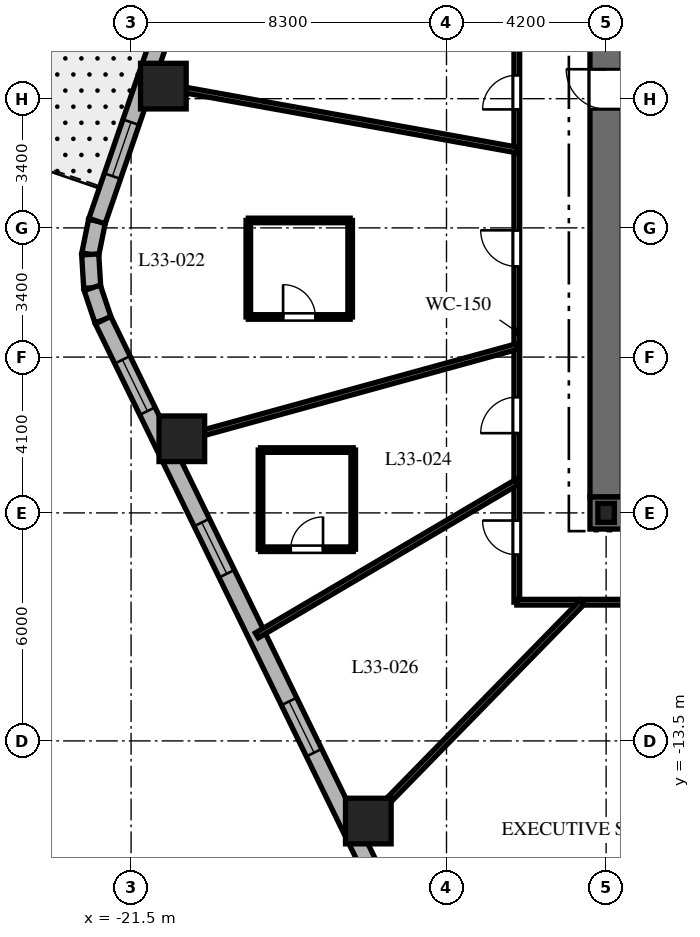
"""IFC4 building model, lengths in metres.
Left out: names, types, materials, properties, quantities, classifications, styles, units other than length and angle.
Written with IfcOpenShell. Run it as: python <this file> out.ifc"""

import sys

from ifc_helpers import new_model, si_unit, direction, frame, frame_2d, origin, origin_2d, place, context, subcontext, project, spatial, rectangle, i_section, extrude, element, fill, save


model = new_model("IFC4")
c1 = context("Model", 3, precision=1e-05, world=origin(), true_north=direction((0.0, 1.0)))
c2 = subcontext(c1, "Body", "Model", "MODEL_VIEW")
j1 = project(units=[si_unit("LENGTHUNIT", "METRE"), si_unit("PLANEANGLEUNIT", "RADIAN")], contexts=[c1])
p1 = place(None, origin())
s1 = spatial("IfcSite", under=j1, at=p1, CompositionType="ELEMENT")
p2 = place(p1, origin())
s2 = spatial("IfcBuilding", under=s1, at=p2, CompositionType="ELEMENT")
p3 = place(p2, frame((0.0, 0.0, 135.8)))
s3 = spatial("IfcBuildingStorey", under=s2, at=p3, CompositionType="ELEMENT", Elevation=135.8)
p4 = place(p3, frame((-9.425, -7.5, 0.0), z_axis=(0.0, 0.0, 1.0), x_axis=(1.0, 0.0, 0.0)))
e1 = element("IfcWall", 1, at=p4, inside=s3, PredefinedType="SHEAR", context=c2, shape_type="SweptSolid", body=[
    extrude(rectangle(XDim=18.85, YDim=0.85, at=frame_2d((9.425, 0.0))), origin(), (0.0, 0.0, 1.0), 3.7),
])
p5 = place(p4, frame((9.475, 0.0, 0.0)))
e2 = element("IfcOpeningElement", 2, at=p5, cuts=e1, PredefinedType="OPENING", context=c2, shape_type="SweptSolid", body=[
    extrude(rectangle(XDim=1.0, YDim=2.15, at=frame_2d((0.5, 1.075))), frame((0.0, 0.435, 0.0), z_axis=(0.0, -1.0, 0.0), x_axis=(1.0, 0.0, 0.0)), (0.0, 0.0, 1.0), 0.87),
])
p6 = place(p3, frame((-9.0, -7.075, 0.0), z_axis=(0.0, 0.0, 1.0), x_axis=(0.0, 1.0, 0.0)))
e3 = element("IfcWall", 3, at=p6, inside=s3, PredefinedType="SHEAR", context=c2, shape_type="SweptSolid", body=[
    extrude(rectangle(XDim=14.15, YDim=0.85, at=frame_2d((7.075, 0.0))), origin(), (0.0, 0.0, 1.0), 3.7),
])
p7 = place(p6, frame((10.2, 0.0, 0.0)))
e4 = element("IfcOpeningElement", 4, at=p7, cuts=e3, PredefinedType="OPENING", context=c2, shape_type="SweptSolid", body=[
    extrude(rectangle(XDim=1.05, YDim=2.15, at=frame_2d((0.525, 1.075))), frame((0.0, 0.435, 0.0), z_axis=(0.0, -1.0, 0.0), x_axis=(1.0, 0.0, 0.0)), (0.0, 0.0, 1.0), 0.87),
])
p8 = place(p3, frame((-9.0, -7.5, 0.0), z_axis=(0.0, 0.0, 1.0), x_axis=(1.0, 0.0, 0.0)))
e5 = element("IfcColumn", 5, at=p8, inside=s3, PredefinedType="COLUMN", context=c2, shape_type="SweptSolid", body=[
    extrude(i_section(OverallWidth=0.432, OverallDepth=0.498, WebThickness=0.056, FlangeThickness=0.089, at=origin_2d()), origin(), (0.0, 0.0, 1.0), 3.7),
])
for number, where, z_axis, x_axis in (
    (6, (-20.65, 3.731, 0.0), (0.0, 0.0, 1.0), (1.0, 0.0, 0.0)),
    (7, (-20.164, -5.549, 0.0), (0.0, 0.0, 1.0), (1.0, 0.0, 0.0)),
    (8, (-15.257, -15.609, 0.0), (0.0, 0.0, 1.0), (1.0, 0.0, 0.0)),
):
    element("IfcColumn", number, at=place(p3, frame(where, z_axis=z_axis, x_axis=x_axis)), inside=s3, PredefinedType="COLUMN", context=c2, shape_type="SweptSolid", body=[
        extrude(rectangle(XDim=1.2, YDim=1.2, at=origin_2d()), origin(), (0.0, 0.0, 1.0), 3.7),
    ])
p9 = place(p3, frame((-22.397, 0.179, 0.0), z_axis=(0.0, 0.0, 1.0), x_axis=(-0.199313589404, -0.979935759669, 0.0)))
e9 = element("IfcWall", 9, at=p9, inside=s3, PredefinedType="SOLIDWALL", context=c2, shape_type="SweptSolid", body=[
    extrude(rectangle(XDim=0.896, YDim=0.45, at=frame_2d((0.448, 0.0))), origin(), (0.0, 0.0, 1.0), 3.38),
])
p10 = place(p3, frame((-22.575, -0.698, 0.0), z_axis=(0.0, 0.0, 1.0), x_axis=(0.060980441946, -0.998138961117, 0.0)))
e10 = element("IfcWall", 10, at=p10, inside=s3, PredefinedType="SOLIDWALL", context=c2, shape_type="SweptSolid", body=[
    extrude(rectangle(XDim=0.881, YDim=0.45, at=frame_2d((0.44, 0.0))), origin(), (0.0, 0.0, 1.0), 3.38),
])
p11 = place(p3, frame((-22.522, -1.577, 0.0), z_axis=(0.0, 0.0, 1.0), x_axis=(0.317372694837, -0.948300887151, 0.0)))
e11 = element("IfcWall", 11, at=p11, inside=s3, PredefinedType="SOLIDWALL", context=c2, shape_type="SweptSolid", body=[
    extrude(rectangle(XDim=0.896, YDim=0.45, at=frame_2d((0.448, 0.0))), origin(), (0.0, 0.0, 1.0), 3.38),
])
p12 = place(p3, frame((-15.992, 18.777, 0.0), z_axis=(0.0, 0.0, 1.0), x_axis=(-0.325606988926, -0.945505202927, 0.0)))
e12 = element("IfcWall", 12, at=p12, inside=s3, PredefinedType="SOLIDWALL", context=c2, shape_type="SweptSolid", body=[
    extrude(rectangle(XDim=19.669, YDim=0.45, at=frame_2d((9.835, 0.0))), origin(), (0.0, 0.0, 1.0), 3.38),
])
p13 = place(p12, frame((4.909, 0.0, 0.0)))
e13 = element("IfcOpeningElement", 13, at=p13, cuts=e12, PredefinedType="OPENING", context=c2, shape_type="SweptSolid", body=[
    extrude(rectangle(XDim=1.0, YDim=2.15, at=frame_2d((0.5, 1.075))), frame((0.0, 0.235, 0.0), z_axis=(0.0, -1.0, 0.0), x_axis=(1.0, 0.0, 0.0)), (0.0, 0.0, 1.0), 0.47),
])
p14 = place(p12, frame((1.197, 0.0, 0.8)))
e14 = element("IfcOpeningElement", 14, at=p14, cuts=e12, PredefinedType="OPENING", context=c2, shape_type="SweptSolid", body=[
    extrude(rectangle(XDim=1.5, YDim=1.8, at=frame_2d((0.75, 0.9))), frame((0.0, 0.235, 0.0), z_axis=(0.0, -1.0, 0.0), x_axis=(1.0, 0.0, 0.0)), (0.0, 0.0, 1.0), 0.47),
])
p15 = place(p12, frame((6.72, 0.0, 0.8)))
e15 = element("IfcOpeningElement", 15, at=p15, cuts=e12, PredefinedType="OPENING", context=c2, shape_type="SweptSolid", body=[
    extrude(rectangle(XDim=1.5, YDim=1.8, at=frame_2d((0.75, 0.9))), frame((0.0, 0.235, 0.0), z_axis=(0.0, -1.0, 0.0), x_axis=(1.0, 0.0, 0.0)), (0.0, 0.0, 1.0), 0.47),
])
p16 = place(p12, frame((12.238, 0.0, 0.8)))
e16 = element("IfcOpeningElement", 16, at=p16, cuts=e12, PredefinedType="OPENING", context=c2, shape_type="SweptSolid", body=[
    extrude(rectangle(XDim=1.5, YDim=1.8, at=frame_2d((0.75, 0.9))), frame((0.0, 0.235, 0.0), z_axis=(0.0, -1.0, 0.0), x_axis=(1.0, 0.0, 0.0)), (0.0, 0.0, 1.0), 0.47),
])
p17 = place(p12, frame((16.918, 0.0, 0.8)))
e17 = element("IfcOpeningElement", 17, at=p17, cuts=e12, PredefinedType="OPENING", context=c2, shape_type="SweptSolid", body=[
    extrude(rectangle(XDim=1.5, YDim=1.8, at=frame_2d((0.75, 0.9))), frame((0.0, 0.235, 0.0), z_axis=(0.0, -1.0, 0.0), x_axis=(1.0, 0.0, 0.0)), (0.0, 0.0, 1.0), 0.47),
])
p18 = place(p3, frame((-22.238, -2.427, 0.0), z_axis=(0.0, 0.0, 1.0), x_axis=(0.438374803278, -0.898792262901, 0.0)))
e18 = element("IfcWall", 18, at=p18, inside=s3, PredefinedType="SOLIDWALL", context=c2, shape_type="SweptSolid", body=[
    extrude(rectangle(XDim=18.618, YDim=0.45, at=frame_2d((9.309, 0.0))), origin(), (0.0, 0.0, 1.0), 3.38),
])
p19 = place(p18, frame((1.163, 0.0, 0.8)))
e19 = element("IfcOpeningElement", 19, at=p19, cuts=e18, PredefinedType="OPENING", context=c2, shape_type="SweptSolid", body=[
    extrude(rectangle(XDim=1.5, YDim=1.8, at=frame_2d((0.75, 0.9))), frame((0.0, 0.235, 0.0), z_axis=(0.0, -1.0, 0.0), x_axis=(1.0, 0.0, 0.0)), (0.0, 0.0, 1.0), 0.47),
])
p20 = place(p18, frame((5.926, 0.0, 0.8)))
e20 = element("IfcOpeningElement", 20, at=p20, cuts=e18, PredefinedType="OPENING", context=c2, shape_type="SweptSolid", body=[
    extrude(rectangle(XDim=1.5, YDim=1.8, at=frame_2d((0.75, 0.9))), frame((0.0, 0.235, 0.0), z_axis=(0.0, -1.0, 0.0), x_axis=(1.0, 0.0, 0.0)), (0.0, 0.0, 1.0), 0.47),
])
p21 = place(p18, frame((11.165, 0.0, 0.8)))
e21 = element("IfcOpeningElement", 21, at=p21, cuts=e18, PredefinedType="OPENING", context=c2, shape_type="SweptSolid", body=[
    extrude(rectangle(XDim=1.5, YDim=1.8, at=frame_2d((0.75, 0.9))), frame((0.0, 0.235, 0.0), z_axis=(0.0, -1.0, 0.0), x_axis=(1.0, 0.0, 0.0)), (0.0, 0.0, 1.0), 0.47),
])
p22 = place(p18, frame((16.006, 0.0, 0.8)))
e22 = element("IfcOpeningElement", 22, at=p22, cuts=e18, PredefinedType="OPENING", context=c2, shape_type="SweptSolid", body=[
    extrude(rectangle(XDim=1.5, YDim=1.8, at=frame_2d((0.75, 0.9))), frame((0.0, 0.235, 0.0), z_axis=(0.0, -1.0, 0.0), x_axis=(1.0, 0.0, 0.0)), (0.0, 0.0, 1.0), 0.47),
])
p23 = place(p3, frame((-11.35, -9.85, 0.0), z_axis=(0.0, 0.0, 1.0), x_axis=(0.0, 1.0, 0.0)))
e23 = element("IfcWall", 23, at=p23, inside=s3, PredefinedType="PARTITIONING", context=c2, shape_type="SweptSolid", body=[
    extrude(rectangle(XDim=19.7, YDim=0.15, at=frame_2d((9.85, 0.0))), origin(), (0.0, 0.0, 1.0), 2.82),
])
p24 = place(p23, frame((16.711, 0.0, 0.0)))
e24 = element("IfcOpeningElement", 24, at=p24, cuts=e23, PredefinedType="OPENING", context=c2, shape_type="SweptSolid", body=[
    extrude(rectangle(XDim=0.95, YDim=2.03, at=frame_2d((0.475, 1.015))), frame((0.0, 0.085, 0.0), z_axis=(0.0, -1.0, 0.0), x_axis=(1.0, 0.0, 0.0)), (0.0, 0.0, 1.0), 0.17),
])
p25 = place(p23, frame((12.968, 0.0, 0.0)))
e25 = element("IfcOpeningElement", 25, at=p25, cuts=e23, PredefinedType="OPENING", context=c2, shape_type="SweptSolid", body=[
    extrude(rectangle(XDim=0.9, YDim=2.03, at=frame_2d((0.45, 1.015))), frame((0.0, 0.085, 0.0), z_axis=(0.0, -1.0, 0.0), x_axis=(1.0, 0.0, 0.0)), (0.0, 0.0, 1.0), 0.17),
])
p26 = place(p23, frame((8.836, 0.0, 0.0)))
e26 = element("IfcOpeningElement", 26, at=p26, cuts=e23, PredefinedType="OPENING", context=c2, shape_type="SweptSolid", body=[
    extrude(rectangle(XDim=0.95, YDim=2.03, at=frame_2d((0.475, 1.015))), frame((0.0, 0.085, 0.0), z_axis=(0.0, -1.0, 0.0), x_axis=(1.0, 0.0, 0.0)), (0.0, 0.0, 1.0), 0.17),
])
p27 = place(p23, frame((4.448, 0.0, 0.0)))
e27 = element("IfcOpeningElement", 27, at=p27, cuts=e23, PredefinedType="OPENING", context=c2, shape_type="SweptSolid", body=[
    extrude(rectangle(XDim=0.95, YDim=2.03, at=frame_2d((0.475, 1.015))), frame((0.0, 0.085, 0.0), z_axis=(0.0, -1.0, 0.0), x_axis=(1.0, 0.0, 0.0)), (0.0, 0.0, 1.0), 0.17),
])
p28 = place(p23, frame((1.249, 0.0, 0.0)))
e28 = element("IfcOpeningElement", 28, at=p28, cuts=e23, PredefinedType="OPENING", context=c2, shape_type="SweptSolid", body=[
    extrude(rectangle(XDim=0.9, YDim=2.03, at=frame_2d((0.45, 1.015))), frame((0.0, 0.085, 0.0), z_axis=(0.0, -1.0, 0.0), x_axis=(1.0, 0.0, 0.0)), (0.0, 0.0, 1.0), 0.17),
])
p29 = place(p3, frame((11.35, -9.85, 0.0), z_axis=(0.0, 0.0, 1.0), x_axis=(-1.0, 0.0, 0.0)))
e29 = element("IfcWall", 29, at=p29, inside=s3, PredefinedType="PARTITIONING", context=c2, shape_type="SweptSolid", body=[
    extrude(rectangle(XDim=22.7, YDim=0.15, at=frame_2d((11.35, 0.0))), origin(), (0.0, 0.0, 1.0), 2.82),
])
p30 = place(p29, frame((17.237, 0.0, 0.0)))
e30 = element("IfcOpeningElement", 30, at=p30, cuts=e29, PredefinedType="OPENING", context=c2, shape_type="SweptSolid", body=[
    extrude(rectangle(XDim=0.95, YDim=2.03, at=frame_2d((0.475, 1.015))), frame((0.0, 0.085, 0.0), z_axis=(0.0, -1.0, 0.0), x_axis=(1.0, 0.0, 0.0)), (0.0, 0.0, 1.0), 0.17),
])
p31 = place(p29, frame((10.45, 0.0, 0.0)))
e31 = element("IfcOpeningElement", 31, at=p31, cuts=e29, PredefinedType="OPENING", context=c2, shape_type="SweptSolid", body=[
    extrude(rectangle(XDim=0.95, YDim=2.03, at=frame_2d((0.475, 1.015))), frame((0.0, 0.085, 0.0), z_axis=(0.0, -1.0, 0.0), x_axis=(1.0, 0.0, 0.0)), (0.0, 0.0, 1.0), 0.17),
])
p32 = place(p29, frame((3.399, 0.0, 0.0)))
e32 = element("IfcOpeningElement", 32, at=p32, cuts=e29, PredefinedType="OPENING", context=c2, shape_type="SweptSolid", body=[
    extrude(rectangle(XDim=0.95, YDim=2.03, at=frame_2d((0.475, 1.015))), frame((0.0, 0.085, 0.0), z_axis=(0.0, -1.0, 0.0), x_axis=(1.0, 0.0, 0.0)), (0.0, 0.0, 1.0), 0.17),
])
p33 = place(p3, frame((-11.35, 2.051, 0.0), z_axis=(0.0, 0.0, 1.0), x_axis=(-0.984068313063, 0.177790762484, 0.0)))
e33 = element("IfcWall", 33, at=p33, inside=s3, PredefinedType="PARTITIONING", context=c2, shape_type="SweptSolid", body=[
    extrude(rectangle(XDim=9.951, YDim=0.15, at=frame_2d((4.976, 0.0))), origin(), (0.0, 0.0, 1.0), 2.52),
])
p34 = place(p3, frame((-11.35, -3.123, 0.0), z_axis=(0.0, 0.0, 1.0), x_axis=(-0.964151983214, -0.265350623261, 0.0)))
e34 = element("IfcWall", 34, at=p34, inside=s3, PredefinedType="PARTITIONING", context=c2, shape_type="SweptSolid", body=[
    extrude(rectangle(XDim=9.645, YDim=0.15, at=frame_2d((4.823, 0.0))), origin(), (0.0, 0.0, 1.0), 2.52),
])
p35 = place(p3, frame((-11.35, -6.691, 0.0), z_axis=(0.0, 0.0, 1.0), x_axis=(-0.861446954497, -0.507847560383, 0.0)))
e35 = element("IfcWall", 35, at=p35, inside=s3, PredefinedType="PARTITIONING", context=c2, shape_type="SweptSolid", body=[
    extrude(rectangle(XDim=7.941, YDim=0.15, at=frame_2d((3.97, 0.0))), origin(), (0.0, 0.0, 1.0), 2.52),
])
p36 = place(p3, frame((-9.628, -9.85, 0.0), z_axis=(0.0, 0.0, 1.0), x_axis=(-0.698992824326, -0.715128681805, 0.0)))
e36 = element("IfcWall", 36, at=p36, inside=s3, PredefinedType="PARTITIONING", context=c2, shape_type="SweptSolid", body=[
    extrude(rectangle(XDim=8.579, YDim=0.15, at=frame_2d((4.29, 0.0))), origin(), (0.0, 0.0, 1.0), 2.52),
])
p37 = place(p3, frame((-18.415, -2.344, 0.0), z_axis=(0.0, 0.0, 1.0), x_axis=(1.0, 0.0, 0.0)))
e37 = element("IfcWall", 37, at=p37, inside=s3, PredefinedType="PARTITIONING", context=c2, shape_type="SweptSolid", body=[
    extrude(rectangle(XDim=2.68, YDim=0.12, at=frame_2d((1.34, 0.0))), origin(), (0.0, 0.0, 1.0), 2.821),
])
p38 = place(p37, frame((0.915, 0.0, 0.0)))
e38 = element("IfcOpeningElement", 38, at=p38, cuts=e37, PredefinedType="OPENING", context=c2, shape_type="SweptSolid", body=[
    extrude(rectangle(XDim=0.85, YDim=2.03, at=frame_2d((0.425, 1.015))), frame((0.0, 0.07, 0.0), z_axis=(0.0, -1.0, 0.0), x_axis=(1.0, 0.0, 0.0)), (0.0, 0.0, 1.0), 0.14),
])
p39 = place(p3, frame((-15.735, -2.344, 0.0), z_axis=(0.0, 0.0, 1.0), x_axis=(0.0, 1.0, 0.0)))
e39 = element("IfcWall", 39, at=p39, inside=s3, PredefinedType="PARTITIONING", context=c2, shape_type="SweptSolid", body=[
    extrude(rectangle(XDim=2.54, YDim=0.12, at=frame_2d((1.27, 0.0))), origin(), (0.0, 0.0, 1.0), 3.38),
])
p40 = place(p3, frame((-15.735, 0.196, 0.0), z_axis=(0.0, 0.0, 1.0), x_axis=(-1.0, 0.0, 0.0)))
e40 = element("IfcWall", 40, at=p40, inside=s3, PredefinedType="PARTITIONING", context=c2, shape_type="SweptSolid", body=[
    extrude(rectangle(XDim=2.68, YDim=0.12, at=frame_2d((1.34, 0.0))), origin(), (0.0, 0.0, 1.0), 2.821),
])
p41 = place(p3, frame((-18.415, 0.196, 0.0), z_axis=(0.0, 0.0, 1.0), x_axis=(0.0, -1.0, 0.0)))
e41 = element("IfcWall", 41, at=p41, inside=s3, PredefinedType="PARTITIONING", context=c2, shape_type="SweptSolid", body=[
    extrude(rectangle(XDim=2.54, YDim=0.12, at=frame_2d((1.27, 0.0))), origin(), (0.0, 0.0, 1.0), 3.38),
])
p42 = place(p3, frame((-18.094, -8.456, 0.0), z_axis=(0.0, 0.0, 1.0), x_axis=(1.0, 0.0, 0.0)))
e42 = element("IfcWall", 42, at=p42, inside=s3, PredefinedType="PARTITIONING", context=c2, shape_type="SweptSolid", body=[
    extrude(rectangle(XDim=2.44, YDim=0.12, at=frame_2d((1.22, 0.0))), origin(), (0.0, 0.0, 1.0), 3.38),
])
p43 = place(p42, frame((0.795, 0.0, 0.0)))
e43 = element("IfcOpeningElement", 43, at=p43, cuts=e42, PredefinedType="OPENING", context=c2, shape_type="SweptSolid", body=[
    extrude(rectangle(XDim=0.85, YDim=2.03, at=frame_2d((0.425, 1.015))), frame((0.0, 0.07, 0.0), z_axis=(0.0, -1.0, 0.0), x_axis=(1.0, 0.0, 0.0)), (0.0, 0.0, 1.0), 0.14),
])
p44 = place(p3, frame((-15.654, -8.456, 0.0), z_axis=(0.0, 0.0, 1.0), x_axis=(0.0, 1.0, 0.0)))
e44 = element("IfcWall", 44, at=p44, inside=s3, PredefinedType="PARTITIONING", context=c2, shape_type="SweptSolid", body=[
    extrude(rectangle(XDim=2.61, YDim=0.12, at=frame_2d((1.305, 0.0))), origin(), (0.0, 0.0, 1.0), 2.82),
])
p45 = place(p3, frame((-15.654, -5.846, 0.0), z_axis=(0.0, 0.0, 1.0), x_axis=(-1.0, 0.0, 0.0)))
e45 = element("IfcWall", 45, at=p45, inside=s3, PredefinedType="PARTITIONING", context=c2, shape_type="SweptSolid", body=[
    extrude(rectangle(XDim=2.44, YDim=0.12, at=frame_2d((1.22, 0.0))), origin(), (0.0, 0.0, 1.0), 2.82),
])
p46 = place(p3, frame((-18.094, -5.846, 0.0), z_axis=(0.0, 0.0, 1.0), x_axis=(0.0, -1.0, 0.0)))
e46 = element("IfcWall", 46, at=p46, inside=s3, PredefinedType="PARTITIONING", context=c2, shape_type="SweptSolid", body=[
    extrude(rectangle(XDim=2.61, YDim=0.12, at=frame_2d((1.305, 0.0))), origin(), (0.0, 0.0, 1.0), 2.82),
])
p47 = place(p17, origin())
e47 = element("IfcWindow", 47, at=p47, inside=s3, PartitioningType="SINGLE_PANEL", PredefinedType="WINDOW", context=c2, shape_type="SweptSolid", body=[
    extrude(rectangle(XDim=1.5, YDim=1.8, at=frame_2d((0.75, 0.9))), frame((0.0, 0.03, 0.0), z_axis=(0.0, -1.0, 0.0), x_axis=(1.0, 0.0, 0.0)), (0.0, 0.0, 1.0), 0.06),
])
fill(e17, e47)
p48 = place(p19, origin())
e48 = element("IfcWindow", 48, at=p48, inside=s3, PartitioningType="SINGLE_PANEL", PredefinedType="WINDOW", context=c2, shape_type="SweptSolid", body=[
    extrude(rectangle(XDim=1.5, YDim=1.8, at=frame_2d((0.75, 0.9))), frame((0.0, 0.03, 0.0), z_axis=(0.0, -1.0, 0.0), x_axis=(1.0, 0.0, 0.0)), (0.0, 0.0, 1.0), 0.06),
])
fill(e19, e48)
p49 = place(p20, origin())
e49 = element("IfcWindow", 49, at=p49, inside=s3, PartitioningType="SINGLE_PANEL", PredefinedType="WINDOW", context=c2, shape_type="SweptSolid", body=[
    extrude(rectangle(XDim=1.5, YDim=1.8, at=frame_2d((0.75, 0.9))), frame((0.0, 0.03, 0.0), z_axis=(0.0, -1.0, 0.0), x_axis=(1.0, 0.0, 0.0)), (0.0, 0.0, 1.0), 0.06),
])
fill(e20, e49)
p50 = place(p21, origin())
e50 = element("IfcWindow", 50, at=p50, inside=s3, PartitioningType="SINGLE_PANEL", PredefinedType="WINDOW", context=c2, shape_type="SweptSolid", body=[
    extrude(rectangle(XDim=1.5, YDim=1.8, at=frame_2d((0.75, 0.9))), frame((0.0, 0.03, 0.0), z_axis=(0.0, -1.0, 0.0), x_axis=(1.0, 0.0, 0.0)), (0.0, 0.0, 1.0), 0.06),
])
fill(e21, e50)
p51 = place(p7, origin())
e51 = element("IfcDoor", 51, at=p51, inside=s3, OperationType="SINGLE_SWING_RIGHT", PredefinedType="DOOR", context=c2, shape_type="SweptSolid", body=[
    extrude(rectangle(XDim=1.05, YDim=2.15, at=frame_2d((0.525, 1.075))), frame((0.0, 0.025, 0.0), z_axis=(0.0, -1.0, 0.0), x_axis=(1.0, 0.0, 0.0)), (0.0, 0.0, 1.0), 0.05),
])
fill(e4, e51)
p52 = place(p25, origin())
e52 = element("IfcDoor", 52, at=p52, inside=s3, OperationType="SINGLE_SWING_LEFT", PredefinedType="DOOR", context=c2, shape_type="SweptSolid", body=[
    extrude(rectangle(XDim=0.9, YDim=2.03, at=frame_2d((0.45, 1.015))), frame((0.0, 0.025, 0.0), z_axis=(0.0, -1.0, 0.0), x_axis=(1.0, 0.0, 0.0)), (0.0, 0.0, 1.0), 0.05),
])
fill(e25, e52)
p53 = place(p26, origin())
e53 = element("IfcDoor", 53, at=p53, inside=s3, OperationType="SINGLE_SWING_RIGHT", PredefinedType="DOOR", context=c2, shape_type="SweptSolid", body=[
    extrude(rectangle(XDim=0.95, YDim=2.03, at=frame_2d((0.475, 1.015))), frame((0.0, 0.025, 0.0), z_axis=(0.0, -1.0, 0.0), x_axis=(1.0, 0.0, 0.0)), (0.0, 0.0, 1.0), 0.05),
])
fill(e26, e53)
p54 = place(p38, origin())
e54 = element("IfcDoor", 54, at=p54, inside=s3, OperationType="SINGLE_SWING_LEFT", PredefinedType="DOOR", context=c2, shape_type="SweptSolid", body=[
    extrude(rectangle(XDim=0.85, YDim=2.03, at=frame_2d((0.425, 1.015))), frame((0.0, 0.025, 0.0), z_axis=(0.0, -1.0, 0.0), x_axis=(1.0, 0.0, 0.0)), (0.0, 0.0, 1.0), 0.05),
])
fill(e38, e54)
p55 = place(p27, origin())
e55 = element("IfcDoor", 55, at=p55, inside=s3, OperationType="SINGLE_SWING_LEFT", PredefinedType="DOOR", context=c2, shape_type="SweptSolid", body=[
    extrude(rectangle(XDim=0.95, YDim=2.03, at=frame_2d((0.475, 1.015))), frame((0.0, 0.025, 0.0), z_axis=(0.0, -1.0, 0.0), x_axis=(1.0, 0.0, 0.0)), (0.0, 0.0, 1.0), 0.05),
])
fill(e27, e55)
p56 = place(p43, origin())
e56 = element("IfcDoor", 56, at=p56, inside=s3, OperationType="SINGLE_SWING_RIGHT", PredefinedType="DOOR", context=c2, shape_type="SweptSolid", body=[
    extrude(rectangle(XDim=0.85, YDim=2.03, at=frame_2d((0.425, 1.015))), frame((0.0, 0.025, 0.0), z_axis=(0.0, -1.0, 0.0), x_axis=(1.0, 0.0, 0.0)), (0.0, 0.0, 1.0), 0.05),
])
fill(e43, e56)
p57 = place(p28, origin())
e57 = element("IfcDoor", 57, at=p57, inside=s3, OperationType="SINGLE_SWING_RIGHT", PredefinedType="DOOR", context=c2, shape_type="SweptSolid", body=[
    extrude(rectangle(XDim=0.9, YDim=2.03, at=frame_2d((0.45, 1.015))), frame((0.0, 0.025, 0.0), z_axis=(0.0, -1.0, 0.0), x_axis=(1.0, 0.0, 0.0)), (0.0, 0.0, 1.0), 0.05),
])
fill(e28, e57)
save(model, sys.argv[1])
